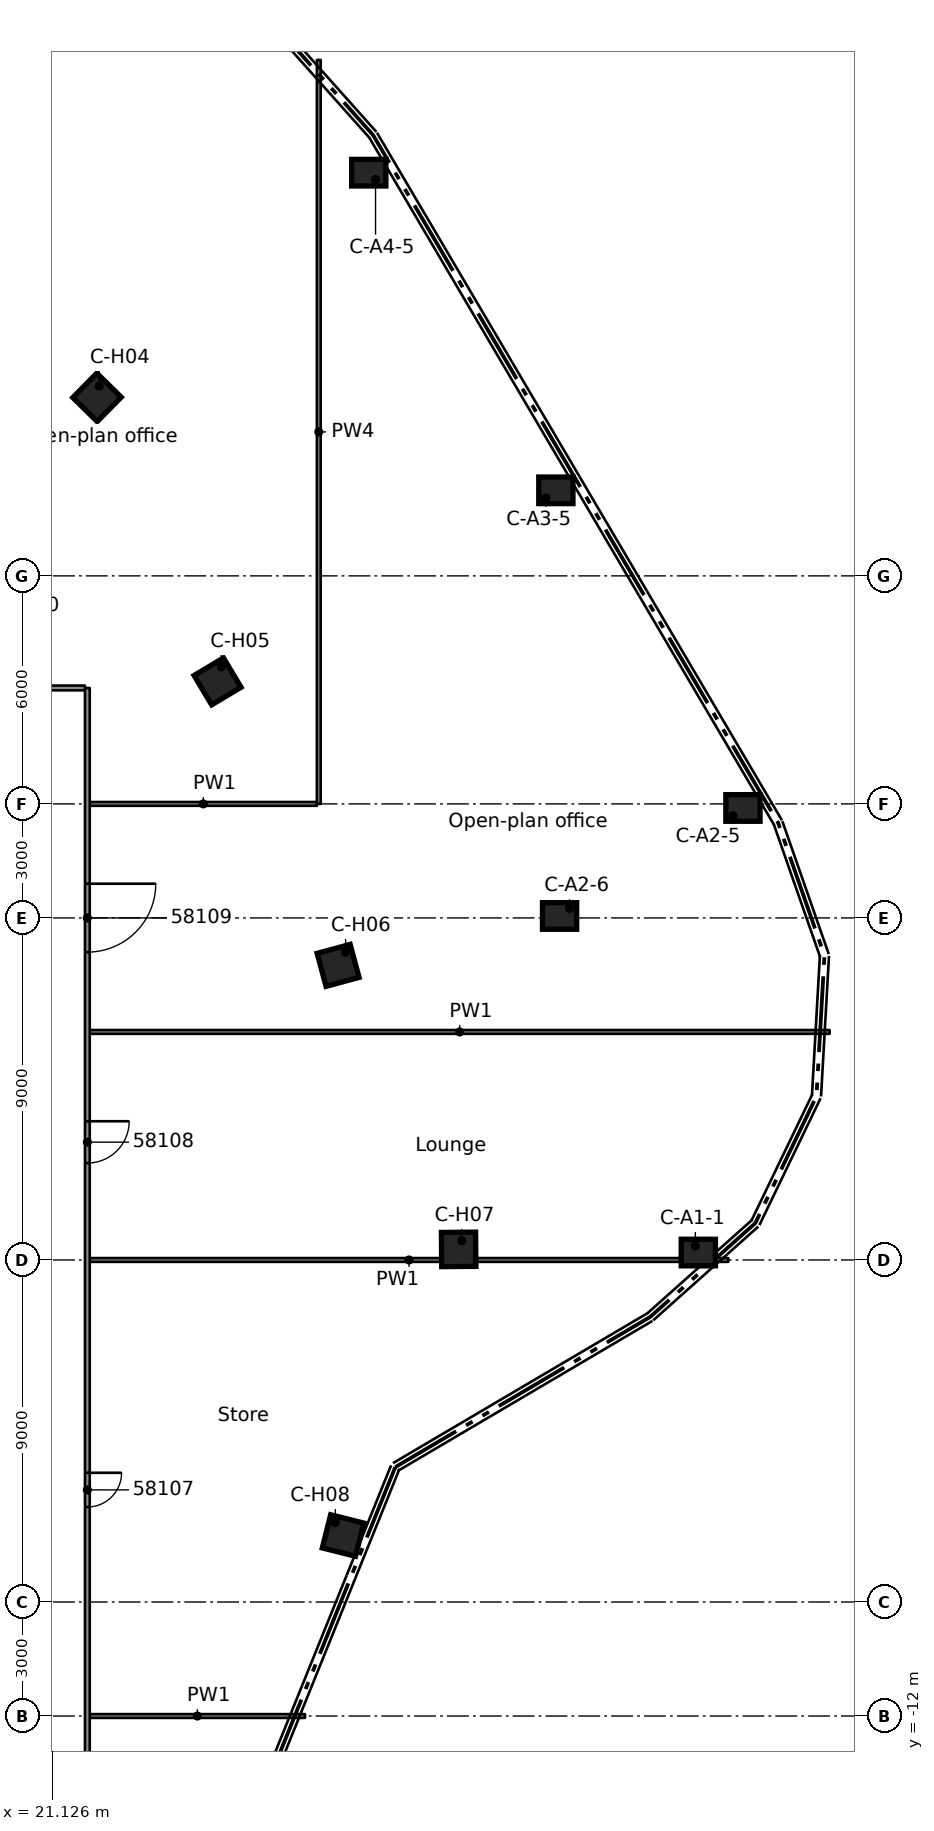
"""IFC4 building model, lengths in metres.
Left out: names, types, materials, properties, quantities, classifications, styles, units other than length and angle.
Written with IfcOpenShell. Run it as: python <this file> out.ifc"""

import sys

from ifc_helpers import new_model, si_unit, direction, frame, frame_2d, origin, origin_2d, place, context, subcontext, project, spatial, rectangle, extrude, element, fill, save


model = new_model("IFC4")
c1 = context("Model", 3, precision=1e-05, world=origin(), true_north=direction((0.0, 1.0)))
c2 = subcontext(c1, "Body", "Model", "MODEL_VIEW")
j1 = project(units=[si_unit("LENGTHUNIT", "METRE"), si_unit("PLANEANGLEUNIT", "RADIAN")], contexts=[c1])
p1 = place(None, origin())
s1 = spatial("IfcSite", under=j1, at=p1, CompositionType="ELEMENT")
p2 = place(p1, origin())
s2 = spatial("IfcBuilding", under=s1, at=p2, CompositionType="ELEMENT")
p3 = place(p2, frame((0.0, 0.0, 285.9)))
s3 = spatial("IfcBuildingStorey", under=s2, at=p3, CompositionType="ELEMENT", Elevation=285.9)
for number, where, z_axis, x_axis in (
    (1, (38.128, 0.195, 0.0), (0.0, 0.0, 1.0), (1.0, 0.0, 0.0)),
    (2, (39.302, 11.893, 0.0), (0.0, 0.0, 1.0), (1.0, 0.0, 0.0)),
    (3, (34.477, 9.051, 0.0), (0.0, 0.0, 1.0), (1.0, 0.0, 0.0)),
    (4, (34.379, 20.251, 0.0), (0.0, 0.0, 1.0), (1.0, 0.0, 0.0)),
    (5, (29.456, 28.609, 0.0), (0.0, 0.0, 1.0), (1.0, 0.0, 0.0)),
):
    element("IfcColumn", number, at=place(p3, frame(where, z_axis=z_axis, x_axis=x_axis)), inside=s3, PredefinedType="COLUMN", context=c2, shape_type="SweptSolid", body=[
        extrude(rectangle(XDim=0.9, YDim=0.7, at=origin_2d()), origin(), (0.0, 0.0, 1.0), 3.5),
    ])
for number, where, z_axis, x_axis in (
    (6, (22.305, 22.697, 0.0), (0.0, 0.0, 1.0), (0.701, 0.713, 0.0)),
    (7, (25.477, 15.224, 0.0), (0.0, 0.0, 1.0), (0.858, 0.513, 0.0)),
    (8, (28.649, 7.751, 0.0), (0.0, 0.0, 1.0), (0.965, 0.261, 0.0)),
    (9, (31.821, 0.278, 0.0), (0.0, 0.0, 1.0), (1.0, 0.009, 0.0)),
    (10, (28.78, -7.25, 0.0), (0.0, 0.0, 1.0), (0.97, -0.244, 0.0)),
):
    element("IfcColumn", number, at=place(p3, frame(where, z_axis=z_axis, x_axis=x_axis)), inside=s3, PredefinedType="COLUMN", context=c2, shape_type="SweptSolid", body=[
        extrude(rectangle(XDim=0.9, YDim=0.9, at=origin_2d()), origin(), (0.0, 0.0, 1.0), 3.5),
    ])
p4 = place(p3, frame((22.113, -12.0, 0.0), z_axis=(0.0, 0.0, 1.0), x_axis=(1.0, 0.0, 0.0)))
e11 = element("IfcWall", 11, at=p4, inside=s3, PredefinedType="PARTITIONING", context=c2, shape_type="SweptSolid", body=[
    extrude(rectangle(XDim=5.665, YDim=0.1, at=frame_2d((2.833, 0.0))), origin(), (0.0, 0.0, 1.0), 3.08),
])
p5 = place(p3, frame((22.113, 0.0, 0.0), z_axis=(0.0, 0.0, 1.0), x_axis=(1.0, 0.0, 0.0)))
e12 = element("IfcWall", 12, at=p5, inside=s3, PredefinedType="PARTITIONING", context=c2, shape_type="SweptSolid", body=[
    extrude(rectangle(XDim=16.803, YDim=0.1, at=frame_2d((8.401, 0.0))), origin(), (0.0, 0.0, 1.0), 3.08),
])
p6 = place(p3, frame((22.113, 6.0, 0.0), z_axis=(0.0, 0.0, 1.0), x_axis=(1.0, 0.0, 0.0)))
e13 = element("IfcWall", 13, at=p6, inside=s3, PredefinedType="PARTITIONING", context=c2, shape_type="SweptSolid", body=[
    extrude(rectangle(XDim=19.47, YDim=0.1, at=frame_2d((9.735, 0.0))), origin(), (0.0, 0.0, 1.0), 3.08),
])
p7 = place(p3, frame((22.113, 12.0, 0.0), z_axis=(0.0, 0.0, 1.0), x_axis=(1.0, 0.0, 0.0)))
e14 = element("IfcWall", 14, at=p7, inside=s3, PredefinedType="PARTITIONING", context=c2, shape_type="SweptSolid", body=[
    extrude(rectangle(XDim=5.978, YDim=0.1, at=frame_2d((2.989, 0.0))), origin(), (0.0, 0.0, 1.0), 3.08),
])
p8 = place(p3, frame((10.991, 15.051, 0.0), z_axis=(0.0, 0.0, 1.0), x_axis=(1.0, 0.0, 0.0)))
e15 = element("IfcWall", 15, at=p8, inside=s3, PredefinedType="PARTITIONING", context=c2, shape_type="SweptSolid", body=[
    extrude(rectangle(XDim=10.997, YDim=0.125, at=frame_2d((5.499, 0.0))), origin(), (0.0, 0.0, 1.0), 3.08),
])
p9 = place(p8, frame((7.38, 0.0, 0.0)))
e16 = element("IfcOpeningElement", 16, at=p9, cuts=e15, PredefinedType="OPENING", context=c2, shape_type="SweptSolid", body=[
    extrude(rectangle(XDim=1.8, YDim=2.1, at=frame_2d((0.9, 1.05))), frame((0.0, 0.073, 0.0), z_axis=(0.0, -1.0, 0.0), x_axis=(1.0, 0.0, 0.0)), (0.0, 0.0, 1.0), 0.145),
])
p10 = place(p8, frame((1.85, 0.0, 0.0)))
e17 = element("IfcOpeningElement", 17, at=p10, cuts=e15, PredefinedType="OPENING", context=c2, shape_type="SweptSolid", body=[
    extrude(rectangle(XDim=1.8, YDim=2.1, at=frame_2d((0.9, 1.05))), frame((0.0, 0.073, 0.0), z_axis=(0.0, -1.0, 0.0), x_axis=(1.0, 0.0, 0.0)), (0.0, 0.0, 1.0), 0.145),
])
p11 = place(p3, frame((28.141, 12.0, 0.0), z_axis=(0.0, 0.0, 1.0), x_axis=(0.0, 1.0, 0.0)))
e18 = element("IfcWall", 18, at=p11, inside=s3, PredefinedType="PARTITIONING", context=c2, shape_type="SweptSolid", body=[
    extrude(rectangle(XDim=19.576, YDim=0.1, at=frame_2d((9.788, 0.0))), origin(), (0.0, 0.0, 1.0), 2.445),
])
p12 = place(p3, frame((22.051, 15.05, 0.0), z_axis=(0.0, 0.0, 1.0), x_axis=(0.0, -1.0, 0.0)))
e19 = element("IfcWall", 19, at=p12, inside=s3, PredefinedType="PARTITIONING", context=c2, shape_type="SweptSolid", body=[
    extrude(rectangle(XDim=30.1, YDim=0.125, at=frame_2d((15.05, 0.0))), origin(), (0.0, 0.0, 1.0), 3.08),
])
p13 = place(p12, frame((28.15, 0.0, 0.0)))
e20 = element("IfcOpeningElement", 20, at=p13, cuts=e19, PredefinedType="OPENING", context=c2, shape_type="SweptSolid", body=[
    extrude(rectangle(XDim=0.9, YDim=2.1, at=frame_2d((0.45, 1.05))), frame((0.0, 0.073, 0.0), z_axis=(0.0, -1.0, 0.0), x_axis=(1.0, 0.0, 0.0)), (0.0, 0.0, 1.0), 0.145),
])
p14 = place(p12, frame((20.65, 0.0, 0.0)))
e21 = element("IfcOpeningElement", 21, at=p14, cuts=e19, PredefinedType="OPENING", context=c2, shape_type="SweptSolid", body=[
    extrude(rectangle(XDim=0.9, YDim=2.1, at=frame_2d((0.45, 1.05))), frame((0.0, 0.073, 0.0), z_axis=(0.0, -1.0, 0.0), x_axis=(1.0, 0.0, 0.0)), (0.0, 0.0, 1.0), 0.145),
])
p15 = place(p12, frame((11.4, 0.0, 0.0)))
e22 = element("IfcOpeningElement", 22, at=p15, cuts=e19, PredefinedType="OPENING", context=c2, shape_type="SweptSolid", body=[
    extrude(rectangle(XDim=1.1, YDim=2.1, at=frame_2d((0.55, 1.05))), frame((0.0, 0.073, 0.0), z_axis=(0.0, -1.0, 0.0), x_axis=(1.0, 0.0, 0.0)), (0.0, 0.0, 1.0), 0.145),
])
p16 = place(p12, frame((5.15, 0.0, 0.0)))
e23 = element("IfcOpeningElement", 23, at=p16, cuts=e19, PredefinedType="OPENING", context=c2, shape_type="SweptSolid", body=[
    extrude(rectangle(XDim=1.8, YDim=2.1, at=frame_2d((0.9, 1.05))), frame((0.0, 0.073, 0.0), z_axis=(0.0, -1.0, 0.0), x_axis=(1.0, 0.0, 0.0)), (0.0, 0.0, 1.0), 0.145),
])
p17 = place(p14, origin())
e24 = element("IfcDoor", 24, at=p17, inside=s3, OperationType="SINGLE_SWING_RIGHT", PredefinedType="DOOR", context=c2, shape_type="SweptSolid", body=[
    extrude(rectangle(XDim=0.9, YDim=2.1, at=frame_2d((0.45, 1.05))), frame((0.0, 0.025, 0.0), z_axis=(0.0, -1.0, 0.0), x_axis=(1.0, 0.0, 0.0)), (0.0, 0.0, 1.0), 0.05),
])
fill(e21, e24)
p18 = place(p15, origin())
e25 = element("IfcDoor", 25, at=p18, inside=s3, OperationType="SINGLE_SWING_LEFT", PredefinedType="DOOR", context=c2, shape_type="SweptSolid", body=[
    extrude(rectangle(XDim=1.1, YDim=2.1, at=frame_2d((0.55, 1.05))), frame((0.0, 0.025, 0.0), z_axis=(0.0, -1.0, 0.0), x_axis=(1.0, 0.0, 0.0)), (0.0, 0.0, 1.0), 0.05),
])
fill(e22, e25)
p19 = place(p16, origin())
e26 = element("IfcDoor", 26, at=p19, inside=s3, OperationType="DOUBLE_DOOR_SINGLE_SWING", PredefinedType="DOOR", context=c2, shape_type="SweptSolid", body=[
    extrude(rectangle(XDim=1.8, YDim=2.1, at=frame_2d((0.9, 1.05))), frame((0.0, 0.025, 0.0), z_axis=(0.0, -1.0, 0.0), x_axis=(1.0, 0.0, 0.0)), (0.0, 0.0, 1.0), 0.05),
])
fill(e23, e26)
save(model, sys.argv[1])
